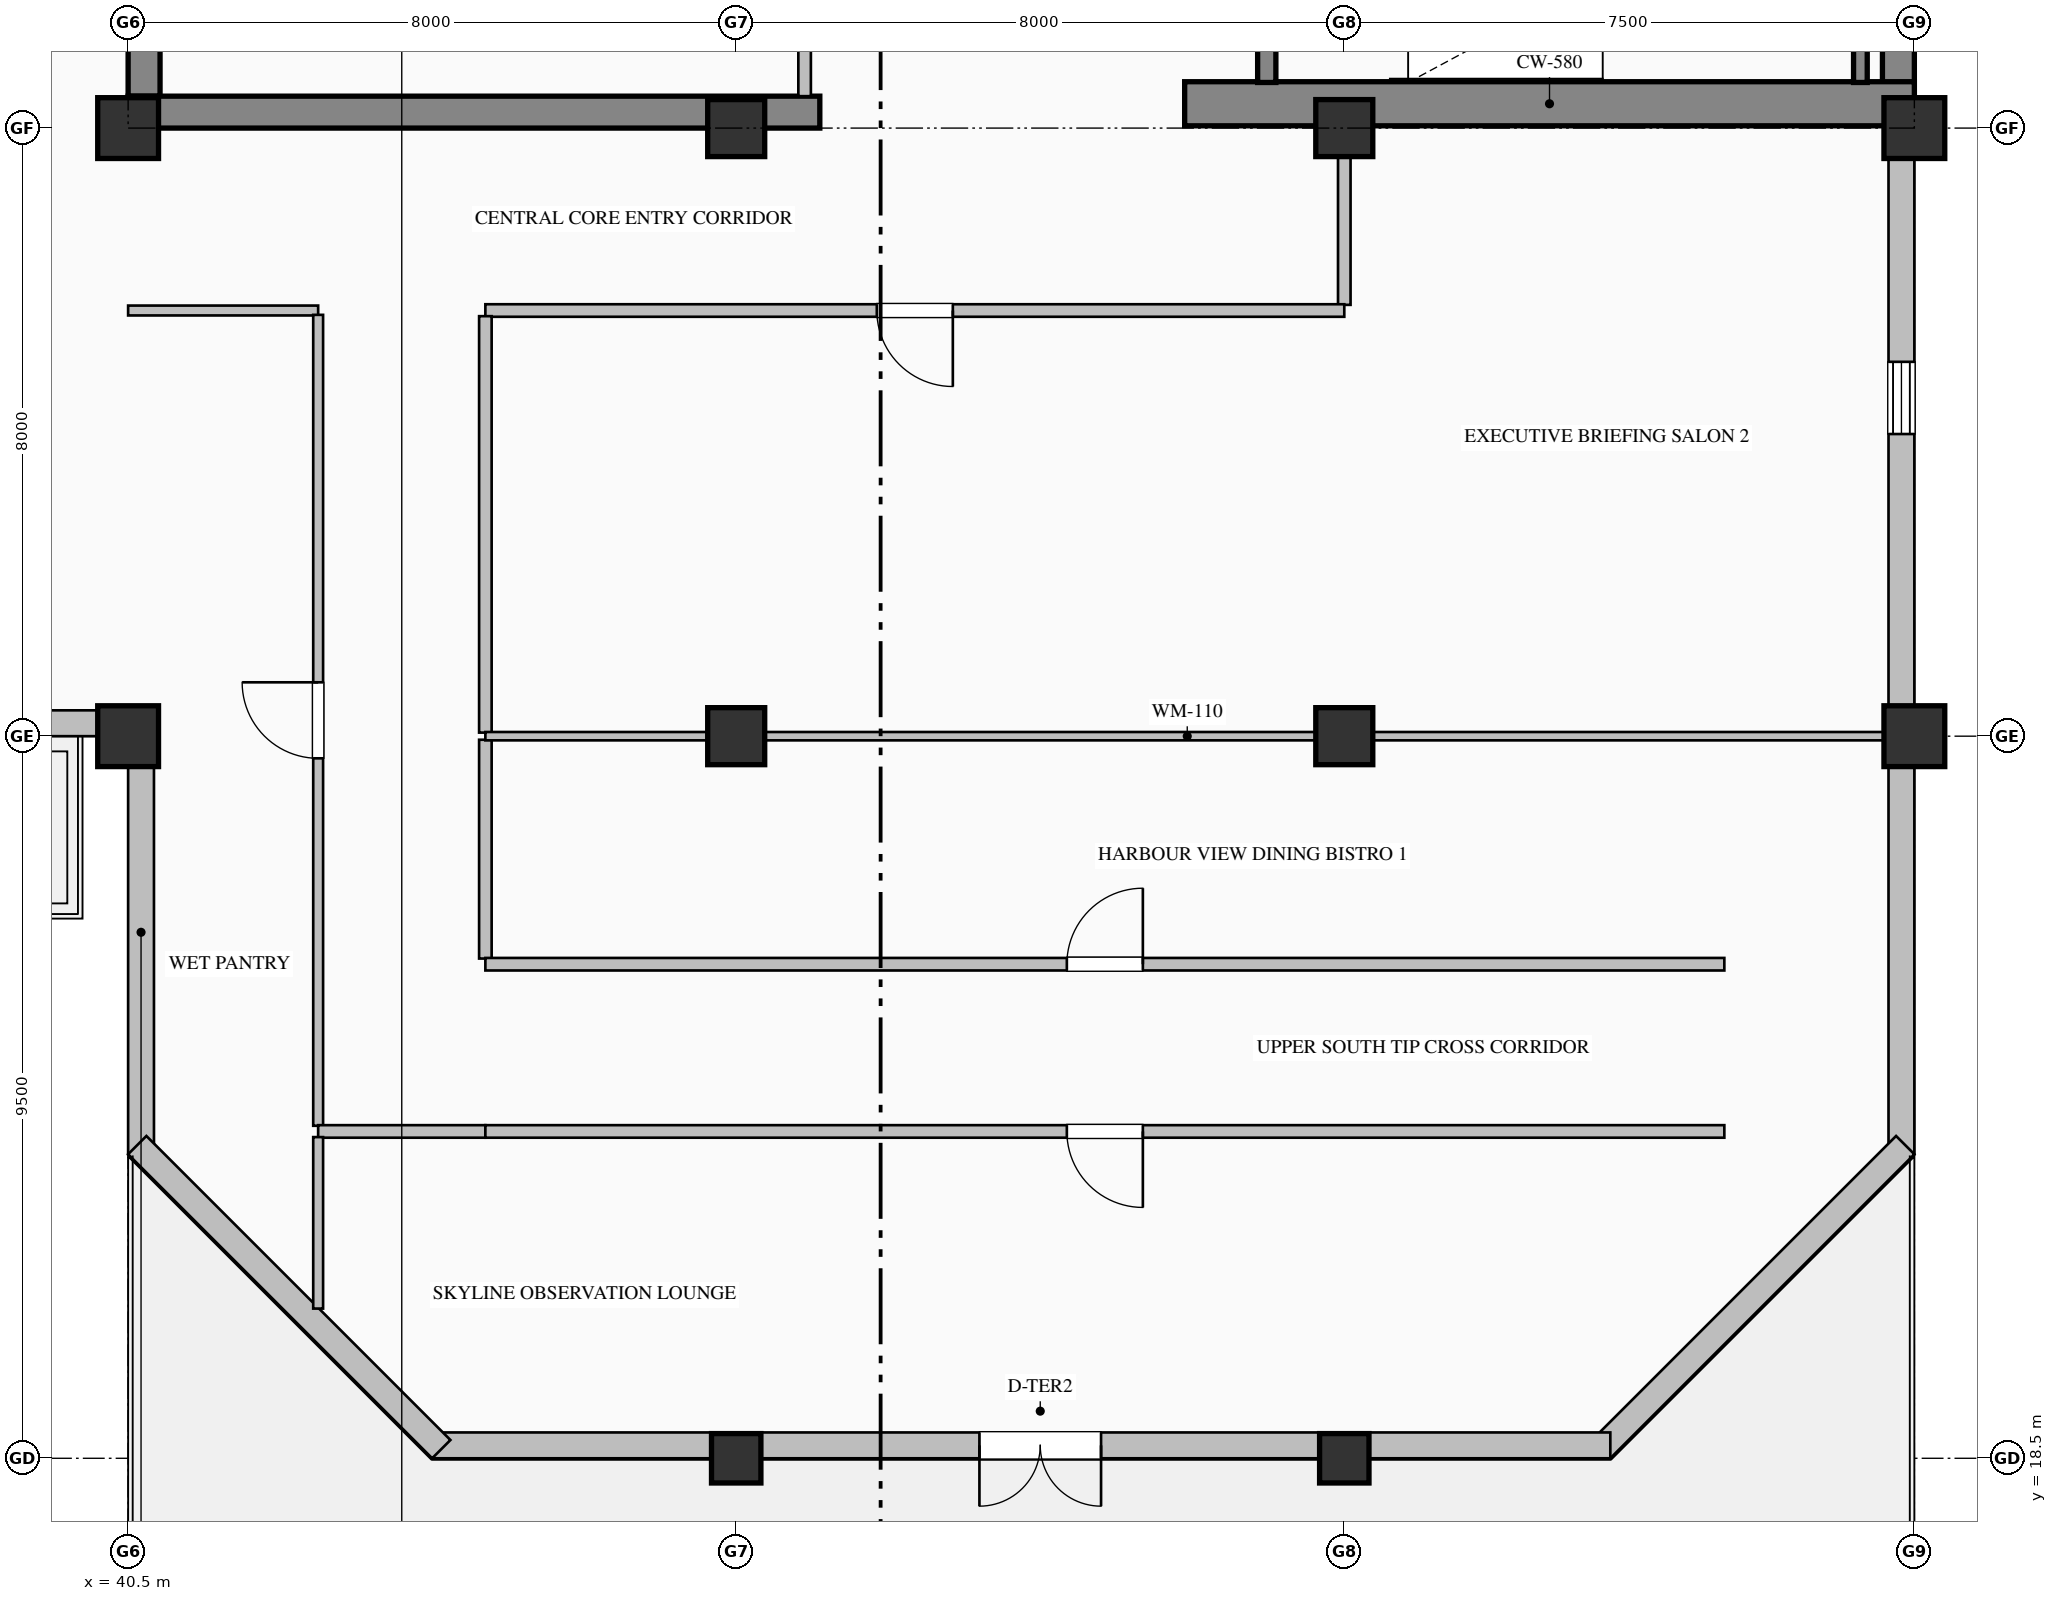
"""IFC4 building model, lengths in metres.
Left out: names, types, materials, properties, quantities, classifications, styles, units other than length and angle.
Written with IfcOpenShell. Run it as: python <this file> out.ifc"""

import sys

from ifc_helpers import new_model, si_unit, direction, frame, frame_2d, origin, origin_2d, place, context, subcontext, project, spatial, rectangle, hollow_rectangle, extrude, element, fill, save


model = new_model("IFC4")
c1 = context("Model", 3, precision=1e-05, world=origin(), true_north=direction((0.0, 1.0)))
c2 = subcontext(c1, "Body", "Model", "MODEL_VIEW")
j1 = project(units=[si_unit("LENGTHUNIT", "METRE"), si_unit("PLANEANGLEUNIT", "RADIAN")], contexts=[c1])
p1 = place(None, origin())
s1 = spatial("IfcSite", under=j1, at=p1, CompositionType="ELEMENT")
p2 = place(p1, origin())
s2 = spatial("IfcBuilding", under=s1, at=p2, CompositionType="ELEMENT")
p3 = place(p2, frame((0.0, 0.0, 287.2)))
s3 = spatial("IfcBuildingStorey", under=s2, at=p3, CompositionType="ELEMENT", Elevation=287.2)
p4 = place(p3, frame((63.79, 36.32, 0.0), z_axis=(0.0, 0.0, 1.0), x_axis=(0.0, 1.0, 0.0)))
e1 = element("IfcWall", 1, at=p4, inside=s3, PredefinedType="SHEAR", context=c2, shape_type="SweptSolid", body=[
    extrude(rectangle(XDim=15.26, YDim=0.42, at=frame_2d((7.63, 0.0))), origin(), (0.0, 0.0, 1.0), 3.785),
])
p5 = place(p3, frame((40.71, 36.42, 0.0), z_axis=(0.0, 0.0, 1.0), x_axis=(0.0, 1.0, 0.0)))
e2 = element("IfcWall", 2, at=p5, inside=s3, PredefinedType="SHEAR", context=c2, shape_type="SweptSolid", body=[
    extrude(rectangle(XDim=7.98, YDim=0.42, at=frame_2d((3.99, 0.0))), origin(), (0.0, 0.0, 1.0), 3.785),
])
p6 = place(p3, frame((40.5, 36.21, 0.0), z_axis=(0.0, 0.0, 1.0), x_axis=(1.0, 0.0, 0.0)))
e3 = element("IfcWall", 3, at=p6, inside=s3, PredefinedType="SHEAR", context=c2, shape_type="SweptSolid", body=[
    extrude(rectangle(XDim=9.1, YDim=0.42, at=frame_2d((4.55, 0.0))), origin(), (0.0, 0.0, 1.0), 3.785),
])
p7 = place(p3, frame((54.4, 36.32, 0.0), z_axis=(0.0, 0.0, 1.0), x_axis=(1.0, 0.0, 0.0)))
e4 = element("IfcWall", 4, at=p7, inside=s3, PredefinedType="SHEAR", context=c2, shape_type="SweptSolid", body=[
    extrude(rectangle(XDim=9.6, YDim=0.58, at=frame_2d((4.8, 0.0))), origin(), (0.0, 0.0, 1.0), 4.0),
])
for number, where, z_axis, x_axis in (
    (5, (40.5, 28.0, 0.0), (0.0, 0.0, 1.0), (1.0, 0.0, 0.0)),
    (6, (40.5, 36.0, 0.0), (0.0, 0.0, 1.0), (1.0, 0.0, 0.0)),
):
    element("IfcColumn", number, at=place(p3, frame(where, z_axis=z_axis, x_axis=x_axis)), inside=s3, PredefinedType="COLUMN", context=c2, shape_type="SweptSolid", body=[
        extrude(hollow_rectangle(XDim=0.8, YDim=0.8, WallThickness=0.032, at=origin_2d()), origin(), (0.0, 0.0, 1.0), 4.0),
    ])
p8 = place(p3, frame((48.5, 18.5, 0.0), z_axis=(0.0, 0.0, 1.0), x_axis=(1.0, 0.0, 0.0)))
e7 = element("IfcColumn", 7, at=p8, inside=s3, PredefinedType="COLUMN", context=c2, shape_type="SweptSolid", body=[
    extrude(hollow_rectangle(XDim=0.65, YDim=0.65, WallThickness=0.028, at=origin_2d()), origin(), (0.0, 0.0, 1.0), 4.0),
])
for number, where, z_axis, x_axis in (
    (8, (48.5, 28.0, 0.0), (0.0, 0.0, 1.0), (1.0, 0.0, 0.0)),
    (9, (48.5, 36.0, 0.0), (0.0, 0.0, 1.0), (1.0, 0.0, 0.0)),
):
    element("IfcColumn", number, at=place(p3, frame(where, z_axis=z_axis, x_axis=x_axis)), inside=s3, PredefinedType="COLUMN", context=c2, shape_type="SweptSolid", body=[
        extrude(rectangle(XDim=0.75, YDim=0.75, at=origin_2d()), origin(), (0.0, 0.0, 1.0), 4.0),
    ])
p9 = place(p3, frame((56.5, 18.5, 0.0), z_axis=(0.0, 0.0, 1.0), x_axis=(1.0, 0.0, 0.0)))
e10 = element("IfcColumn", 10, at=p9, inside=s3, PredefinedType="COLUMN", context=c2, shape_type="SweptSolid", body=[
    extrude(hollow_rectangle(XDim=0.65, YDim=0.65, WallThickness=0.028, at=origin_2d()), origin(), (0.0, 0.0, 1.0), 4.0),
])
for number, where, z_axis, x_axis in (
    (11, (56.5, 28.0, 0.0), (0.0, 0.0, 1.0), (1.0, 0.0, 0.0)),
    (12, (56.5, 36.0, 0.0), (0.0, 0.0, 1.0), (1.0, 0.0, 0.0)),
):
    element("IfcColumn", number, at=place(p3, frame(where, z_axis=z_axis, x_axis=x_axis)), inside=s3, PredefinedType="COLUMN", context=c2, shape_type="SweptSolid", body=[
        extrude(rectangle(XDim=0.75, YDim=0.75, at=origin_2d()), origin(), (0.0, 0.0, 1.0), 4.0),
    ])
for number, where, z_axis, x_axis in (
    (13, (64.0, 28.0, 0.0), (0.0, 0.0, 1.0), (1.0, 0.0, 0.0)),
    (14, (64.0, 36.0, 0.0), (0.0, 0.0, 1.0), (1.0, 0.0, 0.0)),
):
    element("IfcColumn", number, at=place(p3, frame(where, z_axis=z_axis, x_axis=x_axis)), inside=s3, PredefinedType="COLUMN", context=c2, shape_type="SweptSolid", body=[
        extrude(hollow_rectangle(XDim=0.8, YDim=0.8, WallThickness=0.032, at=origin_2d()), origin(), (0.0, 0.0, 1.0), 4.0),
    ])
p10 = place(p3, frame((40.67, 22.5, 0.0), z_axis=(0.0, 0.0, 1.0), x_axis=(0.0, 1.0, 0.0)))
e15 = element("IfcWall", 15, at=p10, inside=s3, PredefinedType="SOLIDWALL", context=c2, shape_type="SweptSolid", body=[
    extrude(rectangle(XDim=5.84, YDim=0.34, at=frame_2d((2.92, 0.0))), origin(), (0.0, 0.0, 1.0), 3.185),
])
p11 = place(p3, frame((40.52, 28.17, 0.0), z_axis=(0.0, 0.0, 1.0), x_axis=(-1.0, 0.0, 0.0)))
e16 = element("IfcWall", 16, at=p11, inside=s3, PredefinedType="SOLIDWALL", context=c2, shape_type="SweptSolid", body=[
    extrude(rectangle(XDim=20.02, YDim=0.34, at=frame_2d((10.01, 0.0))), origin(), (0.0, 0.0, 1.0), 3.185),
])
p12 = place(p11, frame((3.075, 0.0, 0.8)))
e17 = element("IfcOpeningElement", 17, at=p12, cuts=e16, PredefinedType="OPENING", context=c2, shape_type="SweptSolid", body=[
    extrude(rectangle(XDim=1.05, YDim=2.15, at=frame_2d((0.525, 1.075))), frame((0.0, 0.18, 0.0), z_axis=(0.0, -1.0, 0.0), x_axis=(1.0, 0.0, 0.0)), (0.0, 0.0, 1.0), 0.36),
])
p13 = place(p11, frame((13.875, 0.0, 0.8)))
e18 = element("IfcOpeningElement", 18, at=p13, cuts=e16, PredefinedType="OPENING", context=c2, shape_type="SweptSolid", body=[
    extrude(rectangle(XDim=1.05, YDim=2.15, at=frame_2d((0.525, 1.075))), frame((0.0, 0.18, 0.0), z_axis=(0.0, -1.0, 0.0), x_axis=(1.0, 0.0, 0.0)), (0.0, 0.0, 1.0), 0.36),
])
p14 = place(p11, frame((11.395, 0.0, 0.0)))
e19 = element("IfcOpeningElement", 19, at=p14, cuts=e16, PredefinedType="OPENING", context=c2, shape_type="SweptSolid", body=[
    extrude(rectangle(XDim=1.25, YDim=2.25, at=frame_2d((0.625, 1.125))), frame((0.0, 0.18, 0.0), z_axis=(0.0, -1.0, 0.0), x_axis=(1.0, 0.0, 0.0)), (0.0, 0.0, 1.0), 0.36),
])
p15 = place(p3, frame((63.83, 36.05, 0.0), z_axis=(0.0, 0.0, 1.0), x_axis=(0.0, -1.0, 0.0)))
e20 = element("IfcWall", 20, at=p15, inside=s3, PredefinedType="SOLIDWALL", context=c2, shape_type="SweptSolid", body=[
    extrude(rectangle(XDim=13.55, YDim=0.34, at=frame_2d((6.775, 0.0))), origin(), (0.0, 0.0, 1.0), 3.335),
])
p16 = place(p15, frame((3.125, 0.0, 0.9)))
e21 = element("IfcOpeningElement", 21, at=p16, cuts=e20, PredefinedType="OPENING", context=c2, shape_type="SweptSolid", body=[
    extrude(rectangle(XDim=0.95, YDim=1.85, at=frame_2d((0.475, 0.925))), frame((0.0, 0.18, 0.0), z_axis=(0.0, -1.0, 0.0), x_axis=(1.0, 0.0, 0.0)), (0.0, 0.0, 1.0), 0.36),
])
p17 = place(p3, frame((63.88, 22.62, 0.0), z_axis=(0.0, 0.0, 1.0), x_axis=(-0.707106781187, -0.707106781187, 0.0)))
e22 = element("IfcWall", 22, at=p17, inside=s3, PredefinedType="SOLIDWALL", context=c2, shape_type="SweptSolid", body=[
    extrude(rectangle(XDim=5.657, YDim=0.34, at=frame_2d((2.828, 0.0))), origin(), (0.0, 0.0, 1.0), 3.785),
])
p18 = place(p3, frame((60.0, 18.67, 0.0), z_axis=(0.0, 0.0, 1.0), x_axis=(-1.0, 0.0, 0.0)))
e23 = element("IfcWall", 23, at=p18, inside=s3, PredefinedType="SOLIDWALL", context=c2, shape_type="SweptSolid", body=[
    extrude(rectangle(XDim=15.5, YDim=0.34, at=frame_2d((7.75, 0.0))), origin(), (0.0, 0.0, 1.0), 3.335),
])
p19 = place(p18, frame((6.7, 0.0, 0.0)))
e24 = element("IfcOpeningElement", 24, at=p19, cuts=e23, PredefinedType="OPENING", context=c2, shape_type="SweptSolid", body=[
    extrude(rectangle(XDim=1.6, YDim=2.35, at=frame_2d((0.8, 1.175))), frame((0.0, 0.18, 0.0), z_axis=(0.0, -1.0, 0.0), x_axis=(1.0, 0.0, 0.0)), (0.0, 0.0, 1.0), 0.36),
])
p20 = place(p3, frame((44.62, 18.62, 0.0), z_axis=(0.0, 0.0, 1.0), x_axis=(-0.707106781187, 0.707106781187, 0.0)))
e25 = element("IfcWall", 25, at=p20, inside=s3, PredefinedType="SOLIDWALL", context=c2, shape_type="SweptSolid", body=[
    extrude(rectangle(XDim=5.657, YDim=0.34, at=frame_2d((2.828, 0.0))), origin(), (0.0, 0.0, 1.0), 3.785),
])
p21 = place(p3, frame((55.48, 39.75, 0.0), z_axis=(0.0, 0.0, 1.0), x_axis=(0.0, -1.0, 0.0)))
e26 = element("IfcWall", 26, at=p21, inside=s3, PredefinedType="SOLIDWALL", context=c2, shape_type="SweptSolid", body=[
    extrude(rectangle(XDim=3.15, YDim=0.24, at=frame_2d((1.575, 0.0))), origin(), (0.0, 0.0, 1.0), 4.0),
])
p22 = place(p21, frame((1.0, 0.0, 0.0)))
e27 = element("IfcOpeningElement", 27, at=p22, cuts=e26, PredefinedType="OPENING", context=c2, shape_type="SweptSolid", body=[
    extrude(rectangle(XDim=1.15, YDim=2.2, at=frame_2d((0.575, 1.1))), frame((0.0, 0.13, 0.0), z_axis=(0.0, -1.0, 0.0), x_axis=(1.0, 0.0, 0.0)), (0.0, 0.0, 1.0), 0.26),
])
p23 = place(p3, frame((63.29, 36.6, 0.0), z_axis=(0.0, 0.0, 1.0), x_axis=(0.0, 1.0, 0.0)))
e28 = element("IfcWall", 28, at=p23, inside=s3, PredefinedType="SOLIDWALL", context=c2, shape_type="SweptSolid", body=[
    extrude(rectangle(XDim=3.15, YDim=0.18, at=frame_2d((1.575, 0.0))), origin(), (0.0, 0.0, 1.0), 4.0),
])
p24 = place(p3, frame((49.4, 36.42, 0.0), z_axis=(0.0, 0.0, 1.0), x_axis=(0.0, 1.0, 0.0)))
e29 = element("IfcWall", 29, at=p24, inside=s3, PredefinedType="PARTITIONING", context=c2, shape_type="SweptSolid", body=[
    extrude(rectangle(XDim=3.893, YDim=0.165, at=frame_2d((1.947, 0.0))), origin(), (0.0, 0.0, 1.0), 3.027),
])
p25 = place(p24, frame((1.497, 0.0, 0.0)))
e30 = element("IfcOpeningElement", 30, at=p25, cuts=e29, PredefinedType="OPENING", context=c2, shape_type="SweptSolid", body=[
    extrude(rectangle(XDim=0.9, YDim=2.15, at=frame_2d((0.45, 1.075))), frame((0.0, 0.093, 0.0), z_axis=(0.0, -1.0, 0.0), x_axis=(1.0, 0.0, 0.0)), (0.0, 0.0, 1.0), 0.185),
])
p26 = place(p3, frame((56.5, 36.0, 0.0), z_axis=(0.0, 0.0, 1.0), x_axis=(0.0, -1.0, 0.0)))
e31 = element("IfcWall", 31, at=p26, inside=s3, PredefinedType="PARTITIONING", context=c2, shape_type="SweptSolid", body=[
    extrude(rectangle(XDim=2.325, YDim=0.165, at=frame_2d((1.163, 0.0))), origin(), (0.0, 0.0, 1.0), 3.177),
])
p27 = place(p3, frame((56.5, 33.6, 0.0), z_axis=(0.0, 0.0, 1.0), x_axis=(-1.0, 0.0, 0.0)))
e32 = element("IfcWall", 32, at=p27, inside=s3, PredefinedType="PARTITIONING", context=c2, shape_type="SweptSolid", body=[
    extrude(rectangle(XDim=11.3, YDim=0.165, at=frame_2d((5.65, 0.0))), origin(), (0.0, 0.0, 1.0), 3.785),
])
p28 = place(p27, frame((5.15, 0.0, 0.0)))
e33 = element("IfcOpeningElement", 33, at=p28, cuts=e32, PredefinedType="OPENING", context=c2, shape_type="SweptSolid", body=[
    extrude(rectangle(XDim=1.0, YDim=2.15, at=frame_2d((0.5, 1.075))), frame((0.0, 0.093, 0.0), z_axis=(0.0, -1.0, 0.0), x_axis=(1.0, 0.0, 0.0)), (0.0, 0.0, 1.0), 0.185),
])
p29 = place(p3, frame((43.0, 33.6, 0.0), z_axis=(0.0, 0.0, 1.0), x_axis=(-1.0, 0.0, 0.0)))
e34 = element("IfcWall", 34, at=p29, inside=s3, PredefinedType="PARTITIONING", context=c2, shape_type="SweptSolid", body=[
    extrude(rectangle(XDim=2.5, YDim=0.13, at=frame_2d((1.25, 0.0))), origin(), (0.0, 0.0, 1.0), 3.785),
])
p30 = place(p3, frame((45.2, 27.953, 0.0), z_axis=(0.0, 0.0, 1.0), x_axis=(0.0, -1.0, 0.0)))
e35 = element("IfcWall", 35, at=p30, inside=s3, PredefinedType="PARTITIONING", context=c2, shape_type="SweptSolid", body=[
    extrude(rectangle(XDim=2.878, YDim=0.165, at=frame_2d((1.439, 0.0))), origin(), (0.0, 0.0, 1.0), 3.785),
])
p31 = place(p3, frame((45.2, 33.525, 0.0), z_axis=(0.0, 0.0, 1.0), x_axis=(0.0, -1.0, 0.0)))
e36 = element("IfcWall", 36, at=p31, inside=s3, PredefinedType="PARTITIONING", context=c2, shape_type="SweptSolid", body=[
    extrude(rectangle(XDim=5.478, YDim=0.165, at=frame_2d((2.739, 0.0))), origin(), (0.0, 0.0, 1.0), 3.785),
])
p32 = place(p3, frame((43.0, 22.875, 0.0), z_axis=(0.0, 0.0, 1.0), x_axis=(0.0, 1.0, 0.0)))
e37 = element("IfcWall", 37, at=p32, inside=s3, PredefinedType="PARTITIONING", context=c2, shape_type="SweptSolid", body=[
    extrude(rectangle(XDim=10.668, YDim=0.13, at=frame_2d((5.334, 0.0))), origin(), (0.0, 0.0, 1.0), 3.785),
])
p33 = place(p32, frame((4.834, 0.0, 0.0)))
e38 = element("IfcOpeningElement", 38, at=p33, cuts=e37, PredefinedType="OPENING", context=c2, shape_type="SweptSolid", body=[
    extrude(rectangle(XDim=1.0, YDim=2.15, at=frame_2d((0.5, 1.075))), frame((0.0, 0.075, 0.0), z_axis=(0.0, -1.0, 0.0), x_axis=(1.0, 0.0, 0.0)), (0.0, 0.0, 1.0), 0.15),
])
p34 = place(p3, frame((45.2, 22.8, 0.0), z_axis=(0.0, 0.0, 1.0), x_axis=(-1.0, 0.0, 0.0)))
e39 = element("IfcWall", 39, at=p34, inside=s3, PredefinedType="PARTITIONING", context=c2, shape_type="SweptSolid", body=[
    extrude(rectangle(XDim=2.2, YDim=0.165, at=frame_2d((1.1, 0.0))), origin(), (0.0, 0.0, 1.0), 3.785),
])
p35 = place(p3, frame((45.2, 25.0, 0.0), z_axis=(0.0, 0.0, 1.0), x_axis=(1.0, 0.0, 0.0)))
e40 = element("IfcWall", 40, at=p35, inside=s3, PredefinedType="PARTITIONING", context=c2, shape_type="SweptSolid", body=[
    extrude(rectangle(XDim=16.3, YDim=0.165, at=frame_2d((8.15, 0.0))), origin(), (0.0, 0.0, 1.0), 3.785),
])
p36 = place(p35, frame((7.65, 0.0, 0.0)))
e41 = element("IfcOpeningElement", 41, at=p36, cuts=e40, PredefinedType="OPENING", context=c2, shape_type="SweptSolid", body=[
    extrude(rectangle(XDim=1.0, YDim=2.15, at=frame_2d((0.5, 1.075))), frame((0.0, 0.093, 0.0), z_axis=(0.0, -1.0, 0.0), x_axis=(1.0, 0.0, 0.0)), (0.0, 0.0, 1.0), 0.185),
])
p37 = place(p3, frame((61.5, 22.8, 0.0), z_axis=(0.0, 0.0, 1.0), x_axis=(-1.0, 0.0, 0.0)))
e42 = element("IfcWall", 42, at=p37, inside=s3, PredefinedType="PARTITIONING", context=c2, shape_type="SweptSolid", body=[
    extrude(rectangle(XDim=16.3, YDim=0.165, at=frame_2d((8.15, 0.0))), origin(), (0.0, 0.0, 1.0), 3.785),
])
p38 = place(p37, frame((7.65, 0.0, 0.0)))
e43 = element("IfcOpeningElement", 43, at=p38, cuts=e42, PredefinedType="OPENING", context=c2, shape_type="SweptSolid", body=[
    extrude(rectangle(XDim=1.0, YDim=2.15, at=frame_2d((0.5, 1.075))), frame((0.0, 0.093, 0.0), z_axis=(0.0, -1.0, 0.0), x_axis=(1.0, 0.0, 0.0)), (0.0, 0.0, 1.0), 0.185),
])
p39 = place(p3, frame((45.2, 28.0, 0.0), z_axis=(0.0, 0.0, 1.0), x_axis=(1.0, 0.0, 0.0)))
e44 = element("IfcWall", 44, at=p39, inside=s3, PredefinedType="MOVABLE", context=c2, shape_type="SweptSolid", body=[
    extrude(rectangle(XDim=18.468, YDim=0.11, at=frame_2d((9.234, 0.0))), origin(), (0.0, 0.0, 1.0), 3.177),
])
p40 = place(p3, frame((43.0, 22.726, 0.0), z_axis=(0.0, 0.0, 1.0), x_axis=(0.0, -1.0, 0.0)))
e45 = element("IfcWall", 45, at=p40, inside=s3, PredefinedType="PARTITIONING", context=c2, shape_type="SweptSolid", body=[
    extrude(rectangle(XDim=2.256, YDim=0.13, at=frame_2d((1.128, 0.0))), origin(), (0.0, 0.0, 1.0), 3.785),
])
p41 = place(p16, origin())
e46 = element("IfcWindow", 46, at=p41, inside=s3, PartitioningType="SINGLE_PANEL", PredefinedType="WINDOW", context=c2, shape_type="SweptSolid", body=[
    extrude(rectangle(XDim=0.95, YDim=1.85, at=frame_2d((0.475, 0.925))), frame((0.0, 0.15, 0.0), z_axis=(0.0, -1.0, 0.0), x_axis=(1.0, 0.0, 0.0)), (0.0, 0.0, 1.0), 0.06),
])
fill(e21, e46)
p42 = place(p19, origin())
e47 = element("IfcDoor", 47, at=p42, inside=s3, OperationType="DOUBLE_DOOR_SINGLE_SWING", PredefinedType="DOOR", context=c2, shape_type="SweptSolid", body=[
    extrude(rectangle(XDim=1.6, YDim=2.35, at=frame_2d((0.8, 1.175))), frame((0.0, 0.025, 0.0), z_axis=(0.0, -1.0, 0.0), x_axis=(1.0, 0.0, 0.0)), (0.0, 0.0, 1.0), 0.05),
])
fill(e24, e47)
p43 = place(p36, origin())
e48 = element("IfcDoor", 48, at=p43, inside=s3, OperationType="SINGLE_SWING_RIGHT", PredefinedType="DOOR", context=c2, shape_type="SweptSolid", body=[
    extrude(rectangle(XDim=1.0, YDim=2.15, at=frame_2d((0.5, 1.075))), frame((0.0, 0.025, 0.0), z_axis=(0.0, -1.0, 0.0), x_axis=(1.0, 0.0, 0.0)), (0.0, 0.0, 1.0), 0.05),
])
fill(e41, e48)
p44 = place(p28, origin())
e49 = element("IfcDoor", 49, at=p44, inside=s3, OperationType="SINGLE_SWING_LEFT", PredefinedType="DOOR", context=c2, shape_type="SweptSolid", body=[
    extrude(rectangle(XDim=1.0, YDim=2.15, at=frame_2d((0.5, 1.075))), frame((0.0, 0.025, 0.0), z_axis=(0.0, -1.0, 0.0), x_axis=(1.0, 0.0, 0.0)), (0.0, 0.0, 1.0), 0.05),
])
fill(e33, e49)
p45 = place(p33, origin())
e50 = element("IfcDoor", 50, at=p45, inside=s3, OperationType="SINGLE_SWING_RIGHT", PredefinedType="DOOR", context=c2, shape_type="SweptSolid", body=[
    extrude(rectangle(XDim=1.0, YDim=2.15, at=frame_2d((0.5, 1.075))), frame((0.0, 0.025, 0.0), z_axis=(0.0, -1.0, 0.0), x_axis=(1.0, 0.0, 0.0)), (0.0, 0.0, 1.0), 0.05),
])
fill(e38, e50)
p46 = place(p38, origin())
e51 = element("IfcDoor", 51, at=p46, inside=s3, OperationType="SINGLE_SWING_LEFT", PredefinedType="DOOR", context=c2, shape_type="SweptSolid", body=[
    extrude(rectangle(XDim=1.0, YDim=2.15, at=frame_2d((0.5, 1.075))), frame((0.0, 0.025, 0.0), z_axis=(0.0, -1.0, 0.0), x_axis=(1.0, 0.0, 0.0)), (0.0, 0.0, 1.0), 0.05),
])
fill(e43, e51)
save(model, sys.argv[1])
